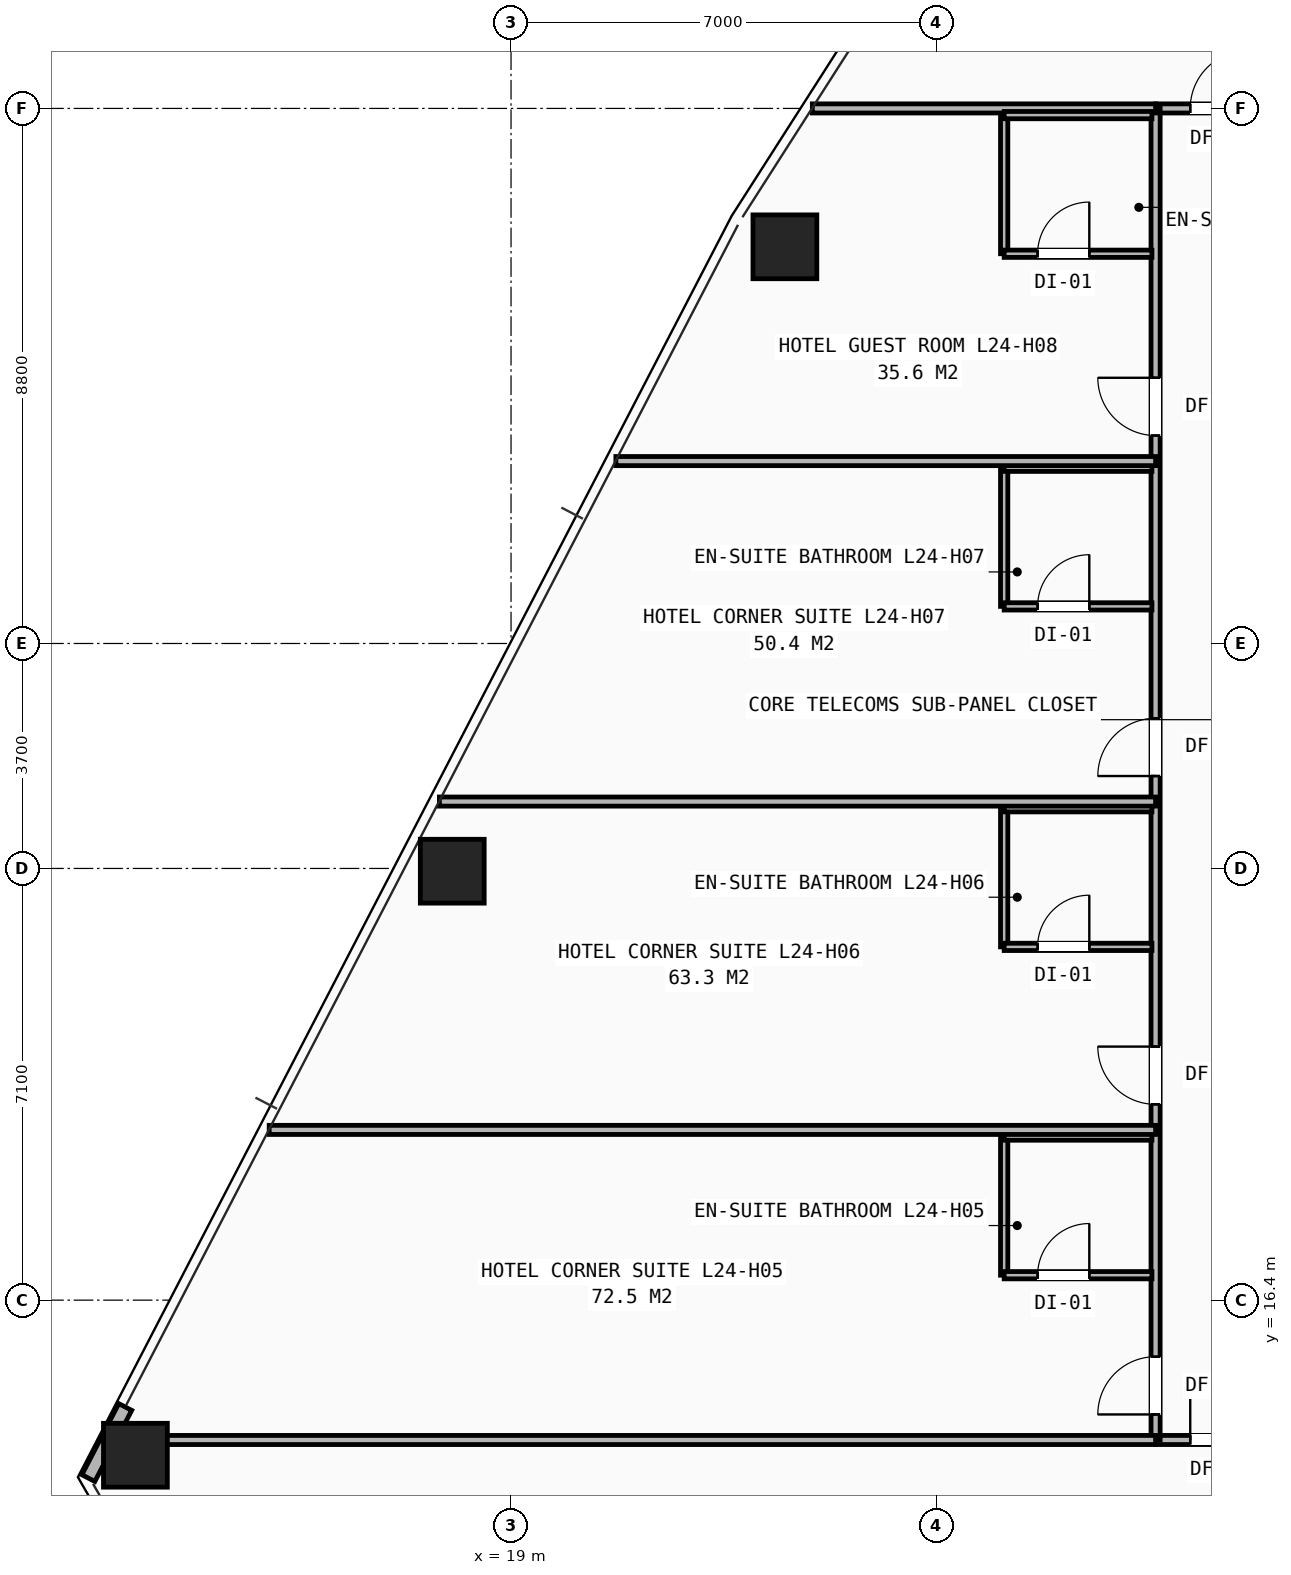
"""IFC4 building model, lengths in metres.
Left out: names, types, materials, properties, quantities, classifications, styles, units other than length and angle.
Written with IfcOpenShell. Run it as: python <this file> out.ifc"""

import sys

from ifc_helpers import new_model, si_unit, direction, frame, frame_2d, origin, origin_2d, place, context, subcontext, project, spatial, rectangle, hollow_rectangle, extrude, element, fill, save


model = new_model("IFC4")
c1 = context("Model", 3, precision=1e-05, world=origin(), true_north=direction((0.0, 1.0)))
c2 = subcontext(c1, "Body", "Model", "MODEL_VIEW")
j1 = project(units=[si_unit("LENGTHUNIT", "METRE"), si_unit("PLANEANGLEUNIT", "RADIAN")], contexts=[c1])
p1 = place(None, origin())
s1 = spatial("IfcSite", under=j1, at=p1, CompositionType="ELEMENT")
p2 = place(p1, origin())
s2 = spatial("IfcBuilding", under=s1, at=p2, CompositionType="ELEMENT")
p3 = place(p2, frame((0.0, 0.0, 86.2)))
s3 = spatial("IfcBuildingStorey", under=s2, at=p3, CompositionType="ELEMENT", Elevation=86.2)
for number, where, z_axis, x_axis in (
    (1, (23.504, 33.724, 0.0), (0.0, 0.0, 1.0), (1.0, 0.0, 0.0)),
    (2, (18.033, 23.455, 0.0), (0.0, 0.0, 1.0), (1.0, 0.0, 0.0)),
    (3, (12.823, 13.849, 0.0), (0.0, 0.0, 1.0), (1.0, 0.0, 0.0)),
):
    element("IfcColumn", number, at=place(p3, frame(where, z_axis=z_axis, x_axis=x_axis)), inside=s3, PredefinedType="COLUMN", context=c2, shape_type="SweptSolid", body=[
        extrude(hollow_rectangle(XDim=1.05, YDim=1.05, WallThickness=0.07, at=origin_2d()), origin(), (0.0, 0.0, 1.0), 3.2),
    ])
p4 = place(p3, frame((12.655, 14.643, 0.0), z_axis=(0.0, 0.0, 1.0), x_axis=(-0.460138651144, -0.887847071135, 0.0)))
e4 = element("IfcWall", 4, at=p4, inside=s3, PredefinedType="SHEAR", context=c2, shape_type="SweptSolid", body=[
    extrude(rectangle(XDim=1.317, YDim=0.24, at=frame_2d((0.659, 0.0))), origin(), (0.0, 0.0, 1.0), 2.253),
])
p5 = place(p3, frame((29.6, 14.1, 0.0), z_axis=(0.0, 0.0, 1.0), x_axis=(1.0, 0.0, 0.0)))
e5 = element("IfcWall", 5, at=p5, inside=s3, PredefinedType="PARTITIONING", context=c2, shape_type="SweptSolid", body=[
    extrude(rectangle(XDim=20.8, YDim=0.15, at=frame_2d((10.4, 0.0))), origin(), (0.0, 0.0, 1.0), 2.421),
])
p6 = place(p5, frame((0.57, 0.0, 0.0)))
e6 = element("IfcOpeningElement", 6, at=p6, cuts=e5, PredefinedType="OPENING", context=c2, shape_type="SweptSolid", body=[
    extrude(rectangle(XDim=0.95, YDim=2.1, at=frame_2d((0.475, 1.05))), frame((0.0, 0.085, 0.0), z_axis=(0.0, -1.0, 0.0), x_axis=(1.0, 0.0, 0.0)), (0.0, 0.0, 1.0), 0.17),
])
p7 = place(p5, frame((5.02, 0.0, 0.0)))
e7 = element("IfcOpeningElement", 7, at=p7, cuts=e5, PredefinedType="OPENING", context=c2, shape_type="SweptSolid", body=[
    extrude(rectangle(XDim=0.95, YDim=2.1, at=frame_2d((0.475, 1.05))), frame((0.0, 0.085, 0.0), z_axis=(0.0, -1.0, 0.0), x_axis=(1.0, 0.0, 0.0)), (0.0, 0.0, 1.0), 0.17),
])
p8 = place(p5, frame((10.62, 0.0, 0.0)))
e8 = element("IfcOpeningElement", 8, at=p8, cuts=e5, PredefinedType="OPENING", context=c2, shape_type="SweptSolid", body=[
    extrude(rectangle(XDim=0.95, YDim=2.1, at=frame_2d((0.475, 1.05))), frame((0.0, 0.085, 0.0), z_axis=(0.0, -1.0, 0.0), x_axis=(1.0, 0.0, 0.0)), (0.0, 0.0, 1.0), 0.17),
])
p9 = place(p5, frame((16.42, 0.0, 0.0)))
e9 = element("IfcOpeningElement", 9, at=p9, cuts=e5, PredefinedType="OPENING", context=c2, shape_type="SweptSolid", body=[
    extrude(rectangle(XDim=0.95, YDim=2.1, at=frame_2d((0.475, 1.05))), frame((0.0, 0.085, 0.0), z_axis=(0.0, -1.0, 0.0), x_axis=(1.0, 0.0, 0.0)), (0.0, 0.0, 1.0), 0.17),
])
p10 = place(p3, frame((29.6, 36.0, 0.0), z_axis=(0.0, 0.0, 1.0), x_axis=(1.0, 0.0, 0.0)))
e10 = element("IfcWall", 10, at=p10, inside=s3, PredefinedType="PARTITIONING", context=c2, shape_type="SweptSolid", body=[
    extrude(rectangle(XDim=9.65, YDim=0.15, at=frame_2d((4.825, 0.0))), origin(), (0.0, 0.0, 1.0), 2.503),
])
p11 = place(p10, frame((0.57, 0.0, 0.0)))
e11 = element("IfcOpeningElement", 11, at=p11, cuts=e10, PredefinedType="OPENING", context=c2, shape_type="SweptSolid", body=[
    extrude(rectangle(XDim=0.95, YDim=2.1, at=frame_2d((0.475, 1.05))), frame((0.0, 0.085, 0.0), z_axis=(0.0, -1.0, 0.0), x_axis=(1.0, 0.0, 0.0)), (0.0, 0.0, 1.0), 0.17),
])
p12 = place(p10, frame((7.62, 0.0, 0.0)))
e12 = element("IfcOpeningElement", 12, at=p12, cuts=e10, PredefinedType="OPENING", context=c2, shape_type="SweptSolid", body=[
    extrude(rectangle(XDim=0.95, YDim=2.1, at=frame_2d((0.475, 1.05))), frame((0.0, 0.085, 0.0), z_axis=(0.0, -1.0, 0.0), x_axis=(1.0, 0.0, 0.0)), (0.0, 0.0, 1.0), 0.17),
])
p13 = place(p3, frame((29.6, 14.1, 0.0), z_axis=(0.0, 0.0, 1.0), x_axis=(0.0, 1.0, 0.0)))
e13 = element("IfcWall", 13, at=p13, inside=s3, PredefinedType="PARTITIONING", context=c2, shape_type="SweptSolid", body=[
    extrude(rectangle(XDim=21.9, YDim=0.15, at=frame_2d((10.95, 0.0))), origin(), (0.0, 0.0, 1.0), 2.421),
])
p14 = place(p13, frame((0.42, 0.0, 0.0)))
e14 = element("IfcOpeningElement", 14, at=p14, cuts=e13, PredefinedType="OPENING", context=c2, shape_type="SweptSolid", body=[
    extrude(rectangle(XDim=0.95, YDim=2.1, at=frame_2d((0.475, 1.05))), frame((0.0, 0.085, 0.0), z_axis=(0.0, -1.0, 0.0), x_axis=(1.0, 0.0, 0.0)), (0.0, 0.0, 1.0), 0.17),
])
p15 = place(p13, frame((5.52, 0.0, 0.0)))
e15 = element("IfcOpeningElement", 15, at=p15, cuts=e13, PredefinedType="OPENING", context=c2, shape_type="SweptSolid", body=[
    extrude(rectangle(XDim=0.95, YDim=2.1, at=frame_2d((0.475, 1.05))), frame((0.0, 0.085, 0.0), z_axis=(0.0, -1.0, 0.0), x_axis=(1.0, 0.0, 0.0)), (0.0, 0.0, 1.0), 0.17),
])
p16 = place(p13, frame((10.92, 0.0, 0.0)))
e16 = element("IfcOpeningElement", 16, at=p16, cuts=e13, PredefinedType="OPENING", context=c2, shape_type="SweptSolid", body=[
    extrude(rectangle(XDim=0.95, YDim=2.1, at=frame_2d((0.475, 1.05))), frame((0.0, 0.085, 0.0), z_axis=(0.0, -1.0, 0.0), x_axis=(1.0, 0.0, 0.0)), (0.0, 0.0, 1.0), 0.17),
])
p17 = place(p13, frame((16.52, 0.0, 0.0)))
e17 = element("IfcOpeningElement", 17, at=p17, cuts=e13, PredefinedType="OPENING", context=c2, shape_type="SweptSolid", body=[
    extrude(rectangle(XDim=0.95, YDim=2.1, at=frame_2d((0.475, 1.05))), frame((0.0, 0.085, 0.0), z_axis=(0.0, -1.0, 0.0), x_axis=(1.0, 0.0, 0.0)), (0.0, 0.0, 1.0), 0.17),
])
p18 = place(p3, frame((12.379, 14.1, 0.0), z_axis=(0.0, 0.0, 1.0), x_axis=(1.0, 0.0, 0.0)))
e18 = element("IfcWall", 18, at=p18, inside=s3, PredefinedType="PARTITIONING", context=c2, shape_type="SweptSolid", body=[
    extrude(rectangle(XDim=17.221, YDim=0.15, at=frame_2d((8.61, 0.0))), origin(), (0.0, 0.0, 1.0), 2.258),
])
p19 = place(p3, frame((23.955, 36.0, 0.0), z_axis=(0.0, 0.0, 1.0), x_axis=(1.0, 0.0, 0.0)))
e19 = element("IfcWall", 19, at=p19, inside=s3, PredefinedType="PARTITIONING", context=c2, shape_type="SweptSolid", body=[
    extrude(rectangle(XDim=5.645, YDim=0.15, at=frame_2d((2.823, 0.0))), origin(), (0.0, 0.0, 1.0), 2.258),
])
p20 = place(p3, frame((27.11, 16.81, 0.0), z_axis=(0.0, 0.0, 1.0), x_axis=(0.0, 1.0, 0.0)))
e20 = element("IfcWall", 20, at=p20, inside=s3, PredefinedType="PARTITIONING", context=c2, shape_type="SweptSolid", body=[
    extrude(rectangle(XDim=2.28, YDim=0.12, at=frame_2d((1.14, 0.0))), origin(), (0.0, 0.0, 1.0), 2.97),
])
p21 = place(p3, frame((27.11, 16.81, 0.0), z_axis=(0.0, 0.0, 1.0), x_axis=(1.0, 0.0, 0.0)))
e21 = element("IfcWall", 21, at=p21, inside=s3, PredefinedType="PARTITIONING", context=c2, shape_type="SweptSolid", body=[
    extrude(rectangle(XDim=2.43, YDim=0.12, at=frame_2d((1.215, 0.0))), origin(), (0.0, 0.0, 1.0), 2.97),
])
p22 = place(p21, frame((0.55, 0.0, 0.0)))
e22 = element("IfcOpeningElement", 22, at=p22, cuts=e21, PredefinedType="OPENING", context=c2, shape_type="SweptSolid", body=[
    extrude(rectangle(XDim=0.85, YDim=2.05, at=frame_2d((0.425, 1.025))), frame((0.0, 0.07, 0.0), z_axis=(0.0, -1.0, 0.0), x_axis=(1.0, 0.0, 0.0)), (0.0, 0.0, 1.0), 0.14),
])
p23 = place(p3, frame((27.11, 19.09, 0.0), z_axis=(0.0, 0.0, 1.0), x_axis=(1.0, 0.0, 0.0)))
e23 = element("IfcWall", 23, at=p23, inside=s3, PredefinedType="PARTITIONING", context=c2, shape_type="SweptSolid", body=[
    extrude(rectangle(XDim=2.43, YDim=0.12, at=frame_2d((1.215, 0.0))), origin(), (0.0, 0.0, 1.0), 2.97),
])
p24 = place(p3, frame((15.023, 19.2, 0.0), z_axis=(0.0, 0.0, 1.0), x_axis=(1.0, 0.0, 0.0)))
e24 = element("IfcWall", 24, at=p24, inside=s3, PredefinedType="PARTITIONING", context=c2, shape_type="SweptSolid", body=[
    extrude(rectangle(XDim=14.577, YDim=0.15, at=frame_2d((7.289, 0.0))), origin(), (0.0, 0.0, 1.0), 2.258),
])
p25 = place(p3, frame((27.11, 22.21, 0.0), z_axis=(0.0, 0.0, 1.0), x_axis=(0.0, 1.0, 0.0)))
e25 = element("IfcWall", 25, at=p25, inside=s3, PredefinedType="PARTITIONING", context=c2, shape_type="SweptSolid", body=[
    extrude(rectangle(XDim=2.28, YDim=0.12, at=frame_2d((1.14, 0.0))), origin(), (0.0, 0.0, 1.0), 2.97),
])
p26 = place(p3, frame((27.11, 22.21, 0.0), z_axis=(0.0, 0.0, 1.0), x_axis=(1.0, 0.0, 0.0)))
e26 = element("IfcWall", 26, at=p26, inside=s3, PredefinedType="PARTITIONING", context=c2, shape_type="SweptSolid", body=[
    extrude(rectangle(XDim=2.43, YDim=0.12, at=frame_2d((1.215, 0.0))), origin(), (0.0, 0.0, 1.0), 2.97),
])
p27 = place(p26, frame((0.55, 0.0, 0.0)))
e27 = element("IfcOpeningElement", 27, at=p27, cuts=e26, PredefinedType="OPENING", context=c2, shape_type="SweptSolid", body=[
    extrude(rectangle(XDim=0.85, YDim=2.05, at=frame_2d((0.425, 1.025))), frame((0.0, 0.07, 0.0), z_axis=(0.0, -1.0, 0.0), x_axis=(1.0, 0.0, 0.0)), (0.0, 0.0, 1.0), 0.14),
])
p28 = place(p3, frame((27.11, 24.49, 0.0), z_axis=(0.0, 0.0, 1.0), x_axis=(1.0, 0.0, 0.0)))
e28 = element("IfcWall", 28, at=p28, inside=s3, PredefinedType="PARTITIONING", context=c2, shape_type="SweptSolid", body=[
    extrude(rectangle(XDim=2.43, YDim=0.12, at=frame_2d((1.215, 0.0))), origin(), (0.0, 0.0, 1.0), 2.97),
])
p29 = place(p3, frame((17.822, 24.6, 0.0), z_axis=(0.0, 0.0, 1.0), x_axis=(1.0, 0.0, 0.0)))
e29 = element("IfcWall", 29, at=p29, inside=s3, PredefinedType="PARTITIONING", context=c2, shape_type="SweptSolid", body=[
    extrude(rectangle(XDim=11.778, YDim=0.15, at=frame_2d((5.889, 0.0))), origin(), (0.0, 0.0, 1.0), 2.258),
])
p30 = place(p3, frame((27.11, 27.81, 0.0), z_axis=(0.0, 0.0, 1.0), x_axis=(0.0, 1.0, 0.0)))
e30 = element("IfcWall", 30, at=p30, inside=s3, PredefinedType="PARTITIONING", context=c2, shape_type="SweptSolid", body=[
    extrude(rectangle(XDim=2.28, YDim=0.12, at=frame_2d((1.14, 0.0))), origin(), (0.0, 0.0, 1.0), 2.97),
])
p31 = place(p3, frame((27.11, 27.81, 0.0), z_axis=(0.0, 0.0, 1.0), x_axis=(1.0, 0.0, 0.0)))
e31 = element("IfcWall", 31, at=p31, inside=s3, PredefinedType="PARTITIONING", context=c2, shape_type="SweptSolid", body=[
    extrude(rectangle(XDim=2.43, YDim=0.12, at=frame_2d((1.215, 0.0))), origin(), (0.0, 0.0, 1.0), 2.97),
])
p32 = place(p31, frame((0.55, 0.0, 0.0)))
e32 = element("IfcOpeningElement", 32, at=p32, cuts=e31, PredefinedType="OPENING", context=c2, shape_type="SweptSolid", body=[
    extrude(rectangle(XDim=0.85, YDim=2.05, at=frame_2d((0.425, 1.025))), frame((0.0, 0.07, 0.0), z_axis=(0.0, -1.0, 0.0), x_axis=(1.0, 0.0, 0.0)), (0.0, 0.0, 1.0), 0.14),
])
p33 = place(p3, frame((27.11, 30.09, 0.0), z_axis=(0.0, 0.0, 1.0), x_axis=(1.0, 0.0, 0.0)))
e33 = element("IfcWall", 33, at=p33, inside=s3, PredefinedType="PARTITIONING", context=c2, shape_type="SweptSolid", body=[
    extrude(rectangle(XDim=2.43, YDim=0.12, at=frame_2d((1.215, 0.0))), origin(), (0.0, 0.0, 1.0), 2.97),
])
p34 = place(p3, frame((20.724, 30.2, 0.0), z_axis=(0.0, 0.0, 1.0), x_axis=(1.0, 0.0, 0.0)))
e34 = element("IfcWall", 34, at=p34, inside=s3, PredefinedType="PARTITIONING", context=c2, shape_type="SweptSolid", body=[
    extrude(rectangle(XDim=8.876, YDim=0.15, at=frame_2d((4.438, 0.0))), origin(), (0.0, 0.0, 1.0), 2.258),
])
p35 = place(p3, frame((27.11, 33.61, 0.0), z_axis=(0.0, 0.0, 1.0), x_axis=(0.0, 1.0, 0.0)))
e35 = element("IfcWall", 35, at=p35, inside=s3, PredefinedType="PARTITIONING", context=c2, shape_type="SweptSolid", body=[
    extrude(rectangle(XDim=2.28, YDim=0.12, at=frame_2d((1.14, 0.0))), origin(), (0.0, 0.0, 1.0), 2.97),
])
p36 = place(p3, frame((27.11, 33.61, 0.0), z_axis=(0.0, 0.0, 1.0), x_axis=(1.0, 0.0, 0.0)))
e36 = element("IfcWall", 36, at=p36, inside=s3, PredefinedType="PARTITIONING", context=c2, shape_type="SweptSolid", body=[
    extrude(rectangle(XDim=2.43, YDim=0.12, at=frame_2d((1.215, 0.0))), origin(), (0.0, 0.0, 1.0), 2.503),
])
p37 = place(p36, frame((0.55, 0.0, 0.0)))
e37 = element("IfcOpeningElement", 37, at=p37, cuts=e36, PredefinedType="OPENING", context=c2, shape_type="SweptSolid", body=[
    extrude(rectangle(XDim=0.85, YDim=2.05, at=frame_2d((0.425, 1.025))), frame((0.0, 0.07, 0.0), z_axis=(0.0, -1.0, 0.0), x_axis=(1.0, 0.0, 0.0)), (0.0, 0.0, 1.0), 0.14),
])
p38 = place(p3, frame((27.11, 35.89, 0.0), z_axis=(0.0, 0.0, 1.0), x_axis=(1.0, 0.0, 0.0)))
e38 = element("IfcWall", 38, at=p38, inside=s3, PredefinedType="PARTITIONING", context=c2, shape_type="SweptSolid", body=[
    extrude(rectangle(XDim=2.43, YDim=0.12, at=frame_2d((1.215, 0.0))), origin(), (0.0, 0.0, 1.0), 2.503),
])
p39 = place(p6, origin())
e39 = element("IfcDoor", 39, at=p39, inside=s3, OperationType="SINGLE_SWING_LEFT", PredefinedType="DOOR", context=c2, shape_type="SweptSolid", body=[
    extrude(rectangle(XDim=0.95, YDim=2.1, at=frame_2d((0.475, 1.05))), frame((0.0, 0.025, 0.0), z_axis=(0.0, -1.0, 0.0), x_axis=(1.0, 0.0, 0.0)), (0.0, 0.0, 1.0), 0.05),
])
fill(e6, e39)
p40 = place(p14, origin())
e40 = element("IfcDoor", 40, at=p40, inside=s3, OperationType="SINGLE_SWING_LEFT", PredefinedType="DOOR", context=c2, shape_type="SweptSolid", body=[
    extrude(rectangle(XDim=0.95, YDim=2.1, at=frame_2d((0.475, 1.05))), frame((0.0, 0.025, 0.0), z_axis=(0.0, -1.0, 0.0), x_axis=(1.0, 0.0, 0.0)), (0.0, 0.0, 1.0), 0.05),
])
fill(e14, e40)
p41 = place(p22, origin())
e41 = element("IfcDoor", 41, at=p41, inside=s3, OperationType="SINGLE_SWING_RIGHT", PredefinedType="DOOR", context=c2, shape_type="SweptSolid", body=[
    extrude(rectangle(XDim=0.85, YDim=2.05, at=frame_2d((0.425, 1.025))), frame((0.0, 0.025, 0.0), z_axis=(0.0, -1.0, 0.0), x_axis=(1.0, 0.0, 0.0)), (0.0, 0.0, 1.0), 0.05),
])
fill(e22, e41)
p42 = place(p15, origin())
e42 = element("IfcDoor", 42, at=p42, inside=s3, OperationType="SINGLE_SWING_RIGHT", PredefinedType="DOOR", context=c2, shape_type="SweptSolid", body=[
    extrude(rectangle(XDim=0.95, YDim=2.1, at=frame_2d((0.475, 1.05))), frame((0.0, 0.025, 0.0), z_axis=(0.0, -1.0, 0.0), x_axis=(1.0, 0.0, 0.0)), (0.0, 0.0, 1.0), 0.05),
])
fill(e15, e42)
p43 = place(p27, origin())
e43 = element("IfcDoor", 43, at=p43, inside=s3, OperationType="SINGLE_SWING_RIGHT", PredefinedType="DOOR", context=c2, shape_type="SweptSolid", body=[
    extrude(rectangle(XDim=0.85, YDim=2.05, at=frame_2d((0.425, 1.025))), frame((0.0, 0.025, 0.0), z_axis=(0.0, -1.0, 0.0), x_axis=(1.0, 0.0, 0.0)), (0.0, 0.0, 1.0), 0.05),
])
fill(e27, e43)
p44 = place(p16, origin())
e44 = element("IfcDoor", 44, at=p44, inside=s3, OperationType="SINGLE_SWING_LEFT", PredefinedType="DOOR", context=c2, shape_type="SweptSolid", body=[
    extrude(rectangle(XDim=0.95, YDim=2.1, at=frame_2d((0.475, 1.05))), frame((0.0, 0.025, 0.0), z_axis=(0.0, -1.0, 0.0), x_axis=(1.0, 0.0, 0.0)), (0.0, 0.0, 1.0), 0.05),
])
fill(e16, e44)
p45 = place(p32, origin())
e45 = element("IfcDoor", 45, at=p45, inside=s3, OperationType="SINGLE_SWING_RIGHT", PredefinedType="DOOR", context=c2, shape_type="SweptSolid", body=[
    extrude(rectangle(XDim=0.85, YDim=2.05, at=frame_2d((0.425, 1.025))), frame((0.0, 0.025, 0.0), z_axis=(0.0, -1.0, 0.0), x_axis=(1.0, 0.0, 0.0)), (0.0, 0.0, 1.0), 0.05),
])
fill(e32, e45)
p46 = place(p17, origin())
e46 = element("IfcDoor", 46, at=p46, inside=s3, OperationType="SINGLE_SWING_RIGHT", PredefinedType="DOOR", context=c2, shape_type="SweptSolid", body=[
    extrude(rectangle(XDim=0.95, YDim=2.1, at=frame_2d((0.475, 1.05))), frame((0.0, 0.025, 0.0), z_axis=(0.0, -1.0, 0.0), x_axis=(1.0, 0.0, 0.0)), (0.0, 0.0, 1.0), 0.05),
])
fill(e17, e46)
p47 = place(p37, origin())
e47 = element("IfcDoor", 47, at=p47, inside=s3, OperationType="SINGLE_SWING_RIGHT", PredefinedType="DOOR", context=c2, shape_type="SweptSolid", body=[
    extrude(rectangle(XDim=0.85, YDim=2.05, at=frame_2d((0.425, 1.025))), frame((0.0, 0.025, 0.0), z_axis=(0.0, -1.0, 0.0), x_axis=(1.0, 0.0, 0.0)), (0.0, 0.0, 1.0), 0.05),
])
fill(e37, e47)
p48 = place(p11, origin())
e48 = element("IfcDoor", 48, at=p48, inside=s3, OperationType="SINGLE_SWING_RIGHT", PredefinedType="DOOR", context=c2, shape_type="SweptSolid", body=[
    extrude(rectangle(XDim=0.95, YDim=2.1, at=frame_2d((0.475, 1.05))), frame((0.0, 0.025, 0.0), z_axis=(0.0, -1.0, 0.0), x_axis=(1.0, 0.0, 0.0)), (0.0, 0.0, 1.0), 0.05),
])
fill(e11, e48)
save(model, sys.argv[1])
